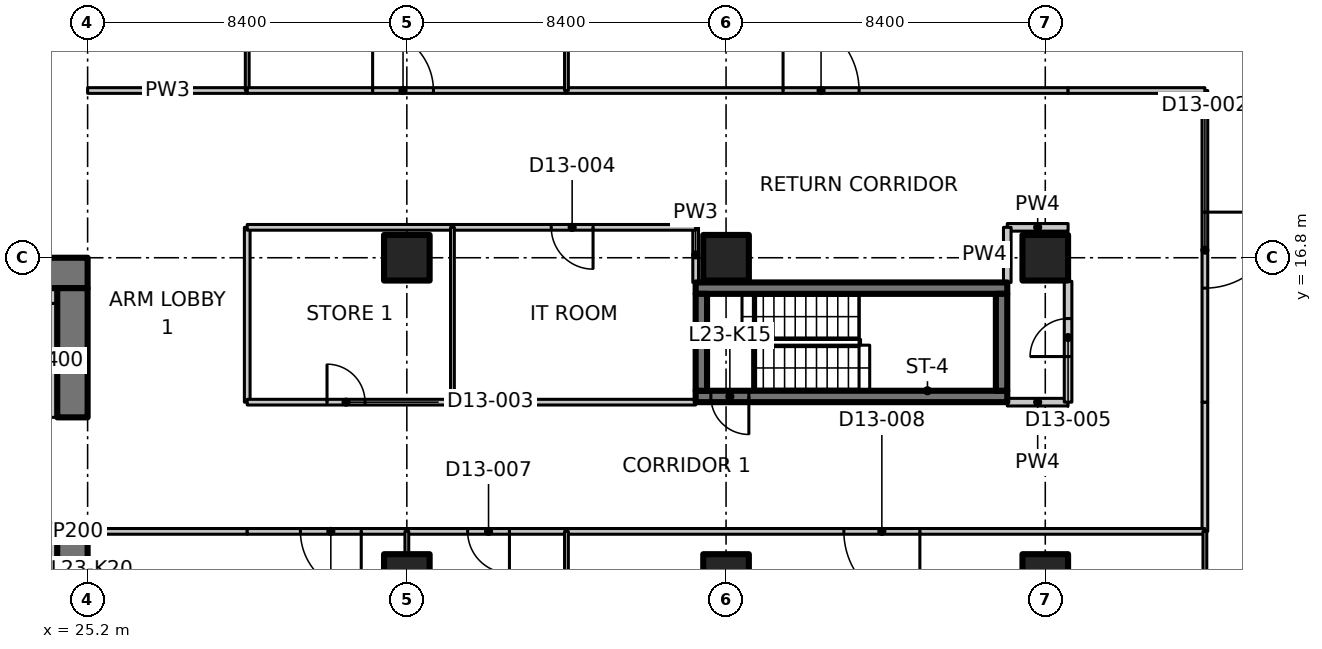
"""IFC4 building model, lengths in metres.
Left out: names, types, materials, properties, quantities, classifications, styles, units other than length and angle.
Written with IfcOpenShell. Run it as: python <this file> out.ifc"""

import sys

from ifc_helpers import new_model, si_unit, direction, frame, frame_2d, origin, origin_2d, place, context, subcontext, project, spatial, polyline, rectangle, outline, extrude, element, fill, save


model = new_model("IFC4")
c1 = context("Model", 3, precision=1e-05, world=origin(), true_north=direction((0.0, 1.0)))
c2 = subcontext(c1, "Body", "Model", "MODEL_VIEW")
j1 = project(units=[si_unit("LENGTHUNIT", "METRE"), si_unit("PLANEANGLEUNIT", "RADIAN")], contexts=[c1])
p1 = place(None, origin())
s1 = spatial("IfcSite", under=j1, at=p1, CompositionType="ELEMENT")
p2 = place(p1, origin())
s2 = spatial("IfcBuilding", under=s1, at=p2, CompositionType="ELEMENT")
p3 = place(p2, frame((0.0, 0.0, 98.9)))
s3 = spatial("IfcBuildingStorey", under=s2, at=p3, CompositionType="ELEMENT", Elevation=98.9)
for number, where, z_axis, x_axis in (
    (1, (33.6, 8.4, 0.0), (0.0, 0.0, 1.0), (1.0, 0.0, 0.0)),
    (2, (33.6, 16.8, 0.0), (0.0, 0.0, 1.0), (1.0, 0.0, 0.0)),
    (3, (42.0, 8.4, 0.0), (0.0, 0.0, 1.0), (1.0, 0.0, 0.0)),
    (4, (42.0, 16.8, 0.0), (0.0, 0.0, 1.0), (1.0, 0.0, 0.0)),
    (5, (50.4, 8.4, 0.0), (0.0, 0.0, 1.0), (1.0, 0.0, 0.0)),
    (6, (50.4, 16.8, 0.0), (0.0, 0.0, 1.0), (1.0, 0.0, 0.0)),
):
    element("IfcColumn", number, at=place(p3, frame(where, z_axis=z_axis, x_axis=x_axis)), inside=s3, PredefinedType="COLUMN", context=c2, shape_type="SweptSolid", body=[
        extrude(rectangle(XDim=1.2, YDim=1.2, at=origin_2d()), origin(), (0.0, 0.0, 1.0), 3.35),
    ])
p4 = place(p3, frame((23.8, 16.4, 0.0), z_axis=(0.0, 0.0, 1.0), x_axis=(1.0, 0.0, 0.0)))
e7 = element("IfcWall", 7, at=p4, inside=s3, PredefinedType="SHEAR", context=c2, shape_type="SweptSolid", body=[
    extrude(rectangle(XDim=1.4, YDim=0.8, at=frame_2d((0.7, 0.0))), origin(), (0.0, 0.0, 1.0), 3.35),
])
p5 = place(p3, frame((24.8, 0.8, 0.0), z_axis=(0.0, 0.0, 1.0), x_axis=(0.0, 1.0, 0.0)))
e8 = element("IfcWall", 8, at=p5, inside=s3, PredefinedType="SHEAR", context=c2, shape_type="SweptSolid", body=[
    extrude(rectangle(XDim=9.0, YDim=0.8, at=frame_2d((4.5, 0.0))), origin(), (0.0, 0.0, 1.0), 3.35),
])
p6 = place(p3, frame((24.8, 12.6, 0.0), z_axis=(0.0, 0.0, 1.0), x_axis=(0.0, 1.0, 0.0)))
e9 = element("IfcWall", 9, at=p6, inside=s3, PredefinedType="SHEAR", context=c2, shape_type="SweptSolid", body=[
    extrude(rectangle(XDim=3.4, YDim=0.8, at=frame_2d((1.7, 0.0))), origin(), (0.0, 0.0, 1.0), 3.35),
])
p7 = place(p3, frame((24.2, 12.6, 0.0), z_axis=(0.0, 0.0, 1.0), x_axis=(0.0, 1.0, 0.0)))
e10 = element("IfcWall", 10, at=p7, inside=s3, PredefinedType="PARTITIONING", context=c2, shape_type="SweptSolid", body=[
    extrude(rectangle(XDim=3.0, YDim=0.4, at=frame_2d((1.5, 0.0))), origin(), (0.0, 0.0, 1.0), 3.35),
])
p8 = place(p3, frame((23.8, 15.8, 0.0), z_axis=(0.0, 0.0, 1.0), x_axis=(1.0, 0.0, 0.0)))
e11 = element("IfcWall", 11, at=p8, inside=s3, PredefinedType="PARTITIONING", context=c2, shape_type="SweptSolid", body=[
    extrude(rectangle(XDim=0.6, YDim=0.4, at=frame_2d((0.3, 0.0))), origin(), (0.0, 0.0, 1.0), 3.35),
])
p9 = place(p3, frame((49.4, 13.15, 0.0), z_axis=(0.0, 0.0, 1.0), x_axis=(-1.0, 0.0, 0.0)))
e12 = element("IfcWall", 12, at=p9, inside=s3, PredefinedType="SHEAR", context=c2, shape_type="SweptSolid", body=[
    extrude(rectangle(XDim=8.2, YDim=0.3, at=frame_2d((4.1, 0.0))), origin(), (0.0, 0.0, 1.0), 3.35),
])
p10 = place(p9, frame((6.8, 0.0, 0.0)))
e13 = element("IfcOpeningElement", 13, at=p10, cuts=e12, PredefinedType="OPENING", context=c2, shape_type="SweptSolid", body=[
    extrude(rectangle(XDim=1.0, YDim=2.1, at=frame_2d((0.5, 1.05))), frame((0.0, 0.16, 0.0), z_axis=(0.0, -1.0, 0.0), x_axis=(1.0, 0.0, 0.0)), (0.0, 0.0, 1.0), 0.32),
])
p11 = place(p3, frame((41.2, 16.0, 0.0), z_axis=(0.0, 0.0, 1.0), x_axis=(1.0, 0.0, 0.0)))
e14 = element("IfcWall", 14, at=p11, inside=s3, PredefinedType="SHEAR", context=c2, shape_type="SweptSolid", body=[
    extrude(rectangle(XDim=8.2, YDim=0.3, at=frame_2d((4.1, 0.0))), origin(), (0.0, 0.0, 1.0), 3.35),
])
for number, where, z_axis, x_axis in (
    (15, (41.35, 13.3, 0.0), (0.0, 0.0, 1.0), (0.0, 1.0, 0.0)),
    (16, (49.25, 13.3, 0.0), (0.0, 0.0, 1.0), (0.0, 1.0, 0.0)),
):
    element("IfcWall", number, at=place(p3, frame(where, z_axis=z_axis, x_axis=x_axis)), inside=s3, PredefinedType="SHEAR", context=c2, shape_type="SweptSolid", body=[
        extrude(rectangle(XDim=2.55, YDim=0.3, at=frame_2d((1.275, 0.0))), origin(), (0.0, 0.0, 1.0), 3.35),
    ])
p12 = place(p3, frame((24.2, 4.35, 0.0), z_axis=(0.0, 0.0, 1.0), x_axis=(0.0, 1.0, 0.0)))
e17 = element("IfcWall", 17, at=p12, inside=s3, PredefinedType="PARTITIONING", context=c2, shape_type="SweptSolid", body=[
    extrude(rectangle(XDim=5.45, YDim=0.4, at=frame_2d((2.725, 0.0))), origin(), (0.0, 0.0, 1.0), 3.35),
])
p13 = place(p3, frame((25.2, 21.2, 0.0), z_axis=(0.0, 0.0, 1.0), x_axis=(1.0, 0.0, 0.0)))
e18 = element("IfcWall", 18, at=p13, inside=s3, PredefinedType="PARTITIONING", context=c2, shape_type="SweptSolid", body=[
    extrude(rectangle(XDim=4.2, YDim=0.15, at=frame_2d((2.1, 0.0))), origin(), (0.0, 0.0, 1.0), 3.33),
])
p14 = place(p3, frame((29.4, 17.6, 0.0), z_axis=(0.0, 0.0, 1.0), x_axis=(0.0, -1.0, 0.0)))
e19 = element("IfcWall", 19, at=p14, inside=s3, PredefinedType="PARTITIONING", context=c2, shape_type="SweptSolid", body=[
    extrude(rectangle(XDim=4.6, YDim=0.15, at=frame_2d((2.3, 0.0))), origin(), (0.0, 0.0, 1.0), 3.33),
])
p15 = place(p3, frame((29.4, 9.6, 0.0), z_axis=(0.0, 0.0, 1.0), x_axis=(-1.0, 0.0, 0.0)))
e20 = element("IfcWall", 20, at=p15, inside=s3, PredefinedType="PARTITIONING", context=c2, shape_type="SweptSolid", body=[
    extrude(rectangle(XDim=4.2, YDim=0.15, at=frame_2d((2.1, 0.0))), origin(), (0.0, 0.0, 1.0), 3.33),
])
p16 = place(p3, frame((29.4, 27.511, 0.0), z_axis=(0.0, 0.0, 1.0), x_axis=(0.0, -1.0, 0.0)))
e21 = element("IfcWall", 21, at=p16, inside=s3, PredefinedType="PARTITIONING", context=c2, shape_type="SweptSolid", body=[
    extrude(outline(polyline([(0.0, 0.0), (6.311, 0.0), (6.311, 3.33), (2.761, 3.33), (2.759, 2.98), (1.863, 2.98), (1.861, 3.33), (0.236, 3.33), (0.0, 3.33), (0.0, 0.0)])), frame((0.0, 0.05, 0.0), z_axis=(0.0, -1.0, 0.0), x_axis=(1.0, 0.0, 0.0)), (0.0, 0.0, 1.0), 0.1),
])
p17 = place(p3, frame((54.6, 13.0, 0.0), z_axis=(0.0, 0.0, 1.0), x_axis=(0.0, -1.0, 0.0)))
e22 = element("IfcWall", 22, at=p17, inside=s3, PredefinedType="PARTITIONING", context=c2, shape_type="SweptSolid", body=[
    extrude(rectangle(XDim=3.4, YDim=0.15, at=frame_2d((1.7, 0.0))), origin(), (0.0, 0.0, 1.0), 3.33),
])
p18 = place(p3, frame((29.4, 13.0, 0.0), z_axis=(0.0, 0.0, 1.0), x_axis=(1.0, 0.0, 0.0)))
e23 = element("IfcWall", 23, at=p18, inside=s3, PredefinedType="PARTITIONING", context=c2, shape_type="SweptSolid", body=[
    extrude(rectangle(XDim=5.4, YDim=0.15, at=frame_2d((2.7, 0.0))), origin(), (0.0, 0.0, 1.0), 3.33),
])
p19 = place(p18, frame((2.1, 0.0, 0.0)))
e24 = element("IfcOpeningElement", 24, at=p19, cuts=e23, PredefinedType="OPENING", context=c2, shape_type="SweptSolid", body=[
    extrude(rectangle(XDim=1.0, YDim=2.1, at=frame_2d((0.5, 1.05))), frame((0.0, 0.085, 0.0), z_axis=(0.0, -1.0, 0.0), x_axis=(1.0, 0.0, 0.0)), (0.0, 0.0, 1.0), 0.17),
])
p20 = place(p3, frame((34.8, 13.0, 0.0), z_axis=(0.0, 0.0, 1.0), x_axis=(1.0, 0.0, 0.0)))
e25 = element("IfcWall", 25, at=p20, inside=s3, PredefinedType="PARTITIONING", context=c2, shape_type="SweptSolid", body=[
    extrude(rectangle(XDim=6.4, YDim=0.15, at=frame_2d((3.2, 0.0))), origin(), (0.0, 0.0, 1.0), 3.33),
])
p21 = place(p3, frame((49.4, 13.0, 0.0), z_axis=(0.0, 0.0, 1.0), x_axis=(1.0, 0.0, 0.0)))
e26 = element("IfcWall", 26, at=p21, inside=s3, PredefinedType="PARTITIONING", context=c2, shape_type="SweptSolid", body=[
    extrude(rectangle(XDim=1.6, YDim=0.2, at=frame_2d((0.8, 0.0))), origin(), (0.0, 0.0, 1.0), 3.33),
])
p22 = place(p3, frame((33.6, 9.6, 0.0), z_axis=(0.0, 0.0, 1.0), x_axis=(-1.0, 0.0, 0.0)))
e27 = element("IfcWall", 27, at=p22, inside=s3, PredefinedType="PARTITIONING", context=c2, shape_type="SweptSolid", body=[
    extrude(rectangle(XDim=4.2, YDim=0.15, at=frame_2d((2.1, 0.0))), origin(), (0.0, 0.0, 1.0), 3.33),
])
p23 = place(p22, frame((1.2, 0.0, 0.0)))
e28 = element("IfcOpeningElement", 28, at=p23, cuts=e27, PredefinedType="OPENING", context=c2, shape_type="SweptSolid", body=[
    extrude(rectangle(XDim=1.6, YDim=2.1, at=frame_2d((0.8, 1.05))), frame((0.0, 0.085, 0.0), z_axis=(0.0, -1.0, 0.0), x_axis=(1.0, 0.0, 0.0)), (0.0, 0.0, 1.0), 0.17),
])
p24 = place(p3, frame((37.8, 9.6, 0.0), z_axis=(0.0, 0.0, 1.0), x_axis=(-1.0, 0.0, 0.0)))
e29 = element("IfcWall", 29, at=p24, inside=s3, PredefinedType="PARTITIONING", context=c2, shape_type="SweptSolid", body=[
    extrude(rectangle(XDim=4.2, YDim=0.15, at=frame_2d((2.1, 0.0))), origin(), (0.0, 0.0, 1.0), 3.33),
])
p25 = place(p24, frame((1.5, 0.0, 0.0)))
e30 = element("IfcOpeningElement", 30, at=p25, cuts=e29, PredefinedType="OPENING", context=c2, shape_type="SweptSolid", body=[
    extrude(rectangle(XDim=1.1, YDim=2.1, at=frame_2d((0.55, 1.05))), frame((0.0, 0.085, 0.0), z_axis=(0.0, -1.0, 0.0), x_axis=(1.0, 0.0, 0.0)), (0.0, 0.0, 1.0), 0.17),
])
p26 = place(p3, frame((54.6, 9.6, 0.0), z_axis=(0.0, 0.0, 1.0), x_axis=(-1.0, 0.0, 0.0)))
e31 = element("IfcWall", 31, at=p26, inside=s3, PredefinedType="PARTITIONING", context=c2, shape_type="SweptSolid", body=[
    extrude(rectangle(XDim=16.8, YDim=0.15, at=frame_2d((8.4, 0.0))), origin(), (0.0, 0.0, 1.0), 3.33),
])
p27 = place(p26, frame((7.5, 0.0, 0.0)))
e32 = element("IfcOpeningElement", 32, at=p27, cuts=e31, PredefinedType="OPENING", context=c2, shape_type="SweptSolid", body=[
    extrude(rectangle(XDim=2.0, YDim=2.4, at=frame_2d((1.0, 1.2))), frame((0.0, 0.085, 0.0), z_axis=(0.0, -1.0, 0.0), x_axis=(1.0, 0.0, 0.0)), (0.0, 0.0, 1.0), 0.17),
])
p28 = place(p3, frame((54.6, 21.2, 0.0), z_axis=(0.0, 0.0, 1.0), x_axis=(0.0, -1.0, 0.0)))
e33 = element("IfcWall", 33, at=p28, inside=s3, PredefinedType="PARTITIONING", context=c2, shape_type="SweptSolid", body=[
    extrude(rectangle(XDim=8.2, YDim=0.15, at=frame_2d((4.1, 0.0))), origin(), (0.0, 0.0, 1.0), 3.33),
])
p29 = place(p28, frame((3.2, 0.0, 0.0)))
e34 = element("IfcOpeningElement", 34, at=p29, cuts=e33, PredefinedType="OPENING", context=c2, shape_type="SweptSolid", body=[
    extrude(rectangle(XDim=2.0, YDim=2.4, at=frame_2d((1.0, 1.2))), frame((0.0, 0.085, 0.0), z_axis=(0.0, -1.0, 0.0), x_axis=(1.0, 0.0, 0.0)), (0.0, 0.0, 1.0), 0.17),
])
p30 = place(p3, frame((54.6, -1.174, 0.0), z_axis=(0.0, 0.0, 1.0), x_axis=(0.0, 1.0, 0.0)))
e35 = element("IfcWall", 35, at=p30, inside=s3, PredefinedType="PARTITIONING", context=c2, shape_type="SweptSolid", body=[
    extrude(outline(polyline([(0.0, 0.0), (10.774, 0.0), (10.774, 3.33), (1.624, 3.33), (1.622, 2.98), (0.726, 2.98), (0.724, 3.33), (0.074, 3.33), (0.0, 3.33), (0.0, 0.0)])), frame((0.0, 0.05, 0.0), z_axis=(0.0, -1.0, 0.0), x_axis=(1.0, 0.0, 0.0)), (0.0, 0.0, 1.0), 0.1),
])
p31 = place(p3, frame((34.8, 17.6, 0.0), z_axis=(0.0, 0.0, 1.0), x_axis=(-1.0, 0.0, 0.0)))
e36 = element("IfcWall", 36, at=p31, inside=s3, PredefinedType="PARTITIONING", context=c2, shape_type="SweptSolid", body=[
    extrude(rectangle(XDim=5.4, YDim=0.15, at=frame_2d((2.7, 0.0))), origin(), (0.0, 0.0, 1.0), 3.33),
])
p32 = place(p3, frame((41.2, 16.15, 0.0), z_axis=(0.0, 0.0, 1.0), x_axis=(0.0, 1.0, 0.0)))
e37 = element("IfcWall", 37, at=p32, inside=s3, PredefinedType="PARTITIONING", context=c2, shape_type="SweptSolid", body=[
    extrude(rectangle(XDim=1.45, YDim=0.15, at=frame_2d((0.725, 0.0))), origin(), (0.0, 0.0, 1.0), 3.33),
])
p33 = place(p3, frame((41.2, 17.6, 0.0), z_axis=(0.0, 0.0, 1.0), x_axis=(-1.0, 0.0, 0.0)))
e38 = element("IfcWall", 38, at=p33, inside=s3, PredefinedType="PARTITIONING", context=c2, shape_type="SweptSolid", body=[
    extrude(rectangle(XDim=6.4, YDim=0.15, at=frame_2d((3.2, 0.0))), origin(), (0.0, 0.0, 1.0), 3.33),
])
p34 = place(p33, frame((2.7, 0.0, 0.0)))
e39 = element("IfcOpeningElement", 39, at=p34, cuts=e38, PredefinedType="OPENING", context=c2, shape_type="SweptSolid", body=[
    extrude(rectangle(XDim=1.1, YDim=2.1, at=frame_2d((0.55, 1.05))), frame((0.0, 0.085, 0.0), z_axis=(0.0, -1.0, 0.0), x_axis=(1.0, 0.0, 0.0)), (0.0, 0.0, 1.0), 0.17),
])
p35 = place(p3, frame((51.0, 17.6, 0.0), z_axis=(0.0, 0.0, 1.0), x_axis=(-1.0, 0.0, 0.0)))
e40 = element("IfcWall", 40, at=p35, inside=s3, PredefinedType="PARTITIONING", context=c2, shape_type="SweptSolid", body=[
    extrude(rectangle(XDim=1.6, YDim=0.2, at=frame_2d((0.8, 0.0))), origin(), (0.0, 0.0, 1.0), 3.33),
])
p36 = place(p3, frame((49.4, 17.6, 0.0), z_axis=(0.0, 0.0, 1.0), x_axis=(0.0, -1.0, 0.0)))
e41 = element("IfcWall", 41, at=p36, inside=s3, PredefinedType="PARTITIONING", context=c2, shape_type="SweptSolid", body=[
    extrude(rectangle(XDim=1.45, YDim=0.2, at=frame_2d((0.725, 0.0))), origin(), (0.0, 0.0, 1.0), 3.33),
])
p37 = place(p3, frame((29.4, 21.2, 0.0), z_axis=(0.0, 0.0, 1.0), x_axis=(1.0, 0.0, 0.0)))
e42 = element("IfcWall", 42, at=p37, inside=s3, PredefinedType="PARTITIONING", context=c2, shape_type="SweptSolid", body=[
    extrude(rectangle(XDim=8.4, YDim=0.15, at=frame_2d((4.2, 0.0))), origin(), (0.0, 0.0, 1.0), 3.33),
])
p38 = place(p37, frame((3.3, 0.0, 0.0)))
e43 = element("IfcOpeningElement", 43, at=p38, cuts=e42, PredefinedType="OPENING", context=c2, shape_type="SweptSolid", body=[
    extrude(rectangle(XDim=1.6, YDim=2.1, at=frame_2d((0.8, 1.05))), frame((0.0, 0.085, 0.0), z_axis=(0.0, -1.0, 0.0), x_axis=(1.0, 0.0, 0.0)), (0.0, 0.0, 1.0), 0.17),
])
p39 = place(p3, frame((37.8, 21.2, 0.0), z_axis=(0.0, 0.0, 1.0), x_axis=(1.0, 0.0, 0.0)))
e44 = element("IfcWall", 44, at=p39, inside=s3, PredefinedType="PARTITIONING", context=c2, shape_type="SweptSolid", body=[
    extrude(rectangle(XDim=13.2, YDim=0.15, at=frame_2d((6.6, 0.0))), origin(), (0.0, 0.0, 1.0), 3.33),
])
p40 = place(p39, frame((5.7, 0.0, 0.0)))
e45 = element("IfcOpeningElement", 45, at=p40, cuts=e44, PredefinedType="OPENING", context=c2, shape_type="SweptSolid", body=[
    extrude(rectangle(XDim=2.0, YDim=2.4, at=frame_2d((1.0, 1.2))), frame((0.0, 0.085, 0.0), z_axis=(0.0, -1.0, 0.0), x_axis=(1.0, 0.0, 0.0)), (0.0, 0.0, 1.0), 0.17),
])
p41 = place(p3, frame((51.0, 13.0, 0.0), z_axis=(0.0, 0.0, 1.0), x_axis=(0.0, 1.0, 0.0)))
e46 = element("IfcWall", 46, at=p41, inside=s3, PredefinedType="PARTITIONING", context=c2, shape_type="SweptSolid", body=[
    extrude(rectangle(XDim=3.18, YDim=0.2, at=frame_2d((1.59, 0.0))), origin(), (0.0, 0.0, 1.0), 3.33),
])
p42 = place(p41, frame((1.2, 0.0, 0.0)))
e47 = element("IfcOpeningElement", 47, at=p42, cuts=e46, PredefinedType="OPENING", context=c2, shape_type="SweptSolid", body=[
    extrude(rectangle(XDim=1.0, YDim=2.1, at=frame_2d((0.5, 1.05))), frame((0.0, 0.11, 0.0), z_axis=(0.0, -1.0, 0.0), x_axis=(1.0, 0.0, 0.0)), (0.0, 0.0, 1.0), 0.22),
])
p43 = place(p3, frame((51.0, 21.2, 0.0), z_axis=(0.0, 0.0, 1.0), x_axis=(1.0, 0.0, 0.0)))
e48 = element("IfcWall", 48, at=p43, inside=s3, PredefinedType="PARTITIONING", context=c2, shape_type="SweptSolid", body=[
    extrude(rectangle(XDim=3.6, YDim=0.15, at=frame_2d((1.8, 0.0))), origin(), (0.0, 0.0, 1.0), 3.33),
])
p44 = place(p3, frame((34.8, 17.6, 0.0), z_axis=(0.0, 0.0, 1.0), x_axis=(0.0, -1.0, 0.0)))
e49 = element("IfcWall", 49, at=p44, inside=s3, PredefinedType="PARTITIONING", context=c2, shape_type="SweptSolid", body=[
    extrude(rectangle(XDim=4.6, YDim=0.1, at=frame_2d((2.3, 0.0))), origin(), (0.0, 0.0, 1.0), 3.33),
])
p45 = place(p3, frame((33.6, 9.6, 0.0), z_axis=(0.0, 0.0, 1.0), x_axis=(0.0, -1.0, 0.0)))
e50 = element("IfcWall", 50, at=p45, inside=s3, PredefinedType="PARTITIONING", context=c2, shape_type="SweptSolid", body=[
    extrude(rectangle(XDim=0.58, YDim=0.1, at=frame_2d((0.29, 0.0))), origin(), (0.0, 0.0, 1.0), 3.33),
])
p46 = place(p3, frame((37.8, 9.6, 0.0), z_axis=(0.0, 0.0, 1.0), x_axis=(0.0, -1.0, 0.0)))
e51 = element("IfcWall", 51, at=p46, inside=s3, PredefinedType="PARTITIONING", context=c2, shape_type="SweptSolid", body=[
    extrude(outline(polyline([(0.0, 0.0), (10.774, 0.0), (10.774, 3.33), (10.7, 3.33), (10.05, 3.33), (10.048, 2.98), (9.152, 2.98), (9.15, 3.33), (0.0, 3.33), (0.0, 0.0)])), frame((0.0, 0.05, 0.0), z_axis=(0.0, -1.0, 0.0), x_axis=(1.0, 0.0, 0.0)), (0.0, 0.0, 1.0), 0.1),
])
p47 = place(p3, frame((37.8, 30.526, 0.0), z_axis=(0.0, 0.0, 1.0), x_axis=(0.0, -1.0, 0.0)))
e52 = element("IfcWall", 52, at=p47, inside=s3, PredefinedType="PARTITIONING", context=c2, shape_type="SweptSolid", body=[
    extrude(outline(polyline([(0.0, 0.0), (9.326, 0.0), (9.326, 3.33), (5.776, 3.33), (5.774, 2.98), (4.878, 2.98), (4.876, 3.33), (0.283, 3.33), (0.0, 3.33), (0.0, 0.0)])), frame((0.0, 0.05, 0.0), z_axis=(0.0, -1.0, 0.0), x_axis=(1.0, 0.0, 0.0)), (0.0, 0.0, 1.0), 0.1),
])
p48 = place(p10, origin())
e53 = element("IfcDoor", 53, at=p48, inside=s3, OperationType="SINGLE_SWING_LEFT", PredefinedType="DOOR", context=c2, shape_type="SweptSolid", body=[
    extrude(rectangle(XDim=1.0, YDim=2.1, at=frame_2d((0.5, 1.05))), frame((0.0, 0.025, 0.0), z_axis=(0.0, -1.0, 0.0), x_axis=(1.0, 0.0, 0.0)), (0.0, 0.0, 1.0), 0.05),
])
fill(e13, e53)
p49 = place(p29, origin())
e54 = element("IfcDoor", 54, at=p49, inside=s3, OperationType="DOUBLE_DOOR_SINGLE_SWING", PredefinedType="DOOR", context=c2, shape_type="SweptSolid", body=[
    extrude(rectangle(XDim=2.0, YDim=2.4, at=frame_2d((1.0, 1.2))), frame((0.0, 0.025, 0.0), z_axis=(0.0, -1.0, 0.0), x_axis=(1.0, 0.0, 0.0)), (0.0, 0.0, 1.0), 0.05),
])
fill(e34, e54)
p50 = place(p19, origin())
e55 = element("IfcDoor", 55, at=p50, inside=s3, OperationType="SINGLE_SWING_LEFT", PredefinedType="DOOR", context=c2, shape_type="SweptSolid", body=[
    extrude(rectangle(XDim=1.0, YDim=2.1, at=frame_2d((0.5, 1.05))), frame((0.0, 0.025, 0.0), z_axis=(0.0, -1.0, 0.0), x_axis=(1.0, 0.0, 0.0)), (0.0, 0.0, 1.0), 0.05),
])
fill(e24, e55)
p51 = place(p34, origin())
e56 = element("IfcDoor", 56, at=p51, inside=s3, OperationType="SINGLE_SWING_LEFT", PredefinedType="DOOR", context=c2, shape_type="SweptSolid", body=[
    extrude(rectangle(XDim=1.1, YDim=2.1, at=frame_2d((0.55, 1.05))), frame((0.0, 0.025, 0.0), z_axis=(0.0, -1.0, 0.0), x_axis=(1.0, 0.0, 0.0)), (0.0, 0.0, 1.0), 0.05),
])
fill(e39, e56)
p52 = place(p42, origin())
e57 = element("IfcDoor", 57, at=p52, inside=s3, OperationType="SINGLE_SWING_LEFT", PredefinedType="DOOR", context=c2, shape_type="SweptSolid", body=[
    extrude(rectangle(XDim=1.0, YDim=2.1, at=frame_2d((0.5, 1.05))), frame((0.0, 0.025, 0.0), z_axis=(0.0, -1.0, 0.0), x_axis=(1.0, 0.0, 0.0)), (0.0, 0.0, 1.0), 0.05),
])
fill(e47, e57)
p53 = place(p23, origin())
e58 = element("IfcDoor", 58, at=p53, inside=s3, OperationType="DOUBLE_DOOR_SINGLE_SWING", PredefinedType="DOOR", context=c2, shape_type="SweptSolid", body=[
    extrude(rectangle(XDim=1.6, YDim=2.1, at=frame_2d((0.8, 1.05))), frame((0.0, 0.025, 0.0), z_axis=(0.0, -1.0, 0.0), x_axis=(1.0, 0.0, 0.0)), (0.0, 0.0, 1.0), 0.05),
])
fill(e28, e58)
p54 = place(p25, origin())
e59 = element("IfcDoor", 59, at=p54, inside=s3, OperationType="SINGLE_SWING_LEFT", PredefinedType="DOOR", context=c2, shape_type="SweptSolid", body=[
    extrude(rectangle(XDim=1.1, YDim=2.1, at=frame_2d((0.55, 1.05))), frame((0.0, 0.025, 0.0), z_axis=(0.0, -1.0, 0.0), x_axis=(1.0, 0.0, 0.0)), (0.0, 0.0, 1.0), 0.05),
])
fill(e30, e59)
p55 = place(p27, origin())
e60 = element("IfcDoor", 60, at=p55, inside=s3, OperationType="DOUBLE_DOOR_SINGLE_SWING", PredefinedType="DOOR", context=c2, shape_type="SweptSolid", body=[
    extrude(rectangle(XDim=2.0, YDim=2.4, at=frame_2d((1.0, 1.2))), frame((0.0, 0.025, 0.0), z_axis=(0.0, -1.0, 0.0), x_axis=(1.0, 0.0, 0.0)), (0.0, 0.0, 1.0), 0.05),
])
fill(e32, e60)
p56 = place(p38, origin())
e61 = element("IfcDoor", 61, at=p56, inside=s3, OperationType="DOUBLE_DOOR_SINGLE_SWING", PredefinedType="DOOR", context=c2, shape_type="SweptSolid", body=[
    extrude(rectangle(XDim=1.6, YDim=2.1, at=frame_2d((0.8, 1.05))), frame((0.0, 0.025, 0.0), z_axis=(0.0, -1.0, 0.0), x_axis=(1.0, 0.0, 0.0)), (0.0, 0.0, 1.0), 0.05),
])
fill(e43, e61)
p57 = place(p40, origin())
e62 = element("IfcDoor", 62, at=p57, inside=s3, OperationType="DOUBLE_DOOR_SINGLE_SWING", PredefinedType="DOOR", context=c2, shape_type="SweptSolid", body=[
    extrude(rectangle(XDim=2.0, YDim=2.4, at=frame_2d((1.0, 1.2))), frame((0.0, 0.025, 0.0), z_axis=(0.0, -1.0, 0.0), x_axis=(1.0, 0.0, 0.0)), (0.0, 0.0, 1.0), 0.05),
])
fill(e45, e62)
save(model, sys.argv[1])
